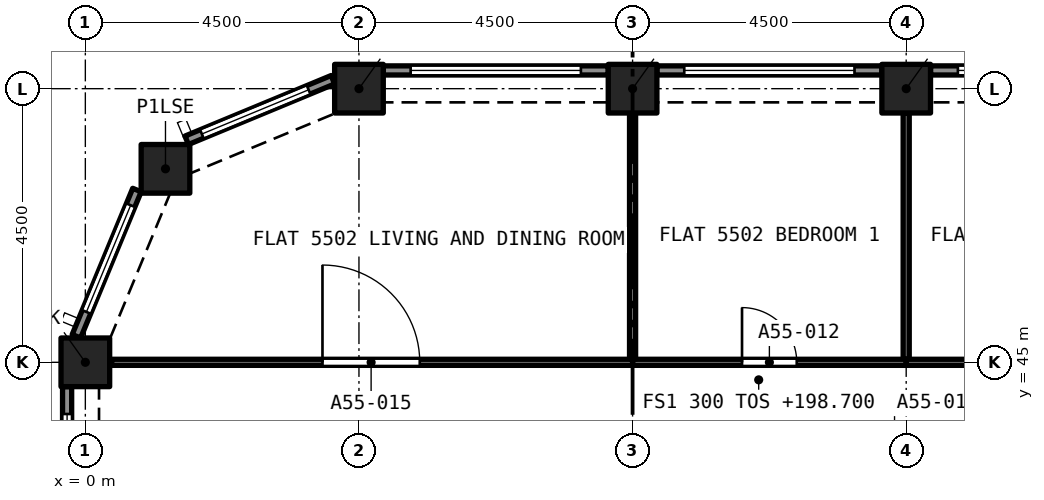
"""IFC4 building model, lengths in metres.
Left out: names, types, materials, properties, quantities, classifications, styles, units other than length and angle.
Written with IfcOpenShell. Run it as: python <this file> out.ifc"""

import sys

from ifc_helpers import new_model, si_unit, direction, frame, frame_2d, origin, origin_2d, place, context, subcontext, project, spatial, rectangle, extrude, element, fill, save


model = new_model("IFC4")
c1 = context("Model", 3, precision=1e-05, world=origin(), true_north=direction((0.0, 1.0)))
c2 = subcontext(c1, "Body", "Model", "MODEL_VIEW")
j1 = project(units=[si_unit("LENGTHUNIT", "METRE"), si_unit("PLANEANGLEUNIT", "RADIAN")], contexts=[c1])
p1 = place(None, origin())
s1 = spatial("IfcSite", under=j1, at=p1, CompositionType="ELEMENT")
p2 = place(p1, origin())
s2 = spatial("IfcBuilding", under=s1, at=p2, CompositionType="ELEMENT")
p3 = place(p2, frame((0.0, 0.0, 198.7)))
s3 = spatial("IfcBuildingStorey", under=s2, at=p3, CompositionType="ELEMENT", Elevation=198.7)
for number, where, z_axis, x_axis in (
    (1, (0.0, 45.0, 0.0), (0.0, 0.0, 1.0), (1.0, 0.0, 0.0)),
    (2, (1.318, 48.182, 0.0), (0.0, 0.0, 1.0), (1.0, 0.0, 0.0)),
    (3, (4.5, 49.5, 0.0), (0.0, 0.0, 1.0), (1.0, 0.0, 0.0)),
    (4, (9.0, 49.5, 0.0), (0.0, 0.0, 1.0), (1.0, 0.0, 0.0)),
    (5, (13.5, 49.5, 0.0), (0.0, 0.0, 1.0), (1.0, 0.0, 0.0)),
):
    element("IfcColumn", number, at=place(p3, frame(where, z_axis=z_axis, x_axis=x_axis)), inside=s3, PredefinedType="COLUMN", context=c2, shape_type="SweptSolid", body=[
        extrude(rectangle(XDim=0.8, YDim=0.8, at=origin_2d()), origin(), (0.0, 0.0, 1.0), 3.2),
    ])
p4 = place(p3, frame((13.9, 49.8, 0.0), z_axis=(0.0, 0.0, 1.0), x_axis=(1.0, 0.0, 0.0)))
e6 = element("IfcWall", 6, at=p4, inside=s3, PredefinedType="SOLIDWALL", context=c2, shape_type="SweptSolid", body=[
    extrude(rectangle(XDim=3.7, YDim=0.15, at=frame_2d((1.85, 0.0))), origin(), (0.0, 0.0, 1.0), 3.2),
])
p5 = place(p4, frame((0.45, 0.0, 0.45)))
e7 = element("IfcOpeningElement", 7, at=p5, cuts=e6, PredefinedType="OPENING", context=c2, shape_type="SweptSolid", body=[
    extrude(rectangle(XDim=2.8, YDim=1.95, at=frame_2d((1.4, 0.975))), frame((0.0, 0.085, 0.0), z_axis=(0.0, -1.0, 0.0), x_axis=(1.0, 0.0, 0.0)), (0.0, 0.0, 1.0), 0.17),
])
p6 = place(p3, frame((9.4, 49.8, 0.0), z_axis=(0.0, 0.0, 1.0), x_axis=(1.0, 0.0, 0.0)))
e8 = element("IfcWall", 8, at=p6, inside=s3, PredefinedType="SOLIDWALL", context=c2, shape_type="SweptSolid", body=[
    extrude(rectangle(XDim=3.7, YDim=0.15, at=frame_2d((1.85, 0.0))), origin(), (0.0, 0.0, 1.0), 3.2),
])
p7 = place(p6, frame((0.45, 0.0, 0.45)))
e9 = element("IfcOpeningElement", 9, at=p7, cuts=e8, PredefinedType="OPENING", context=c2, shape_type="SweptSolid", body=[
    extrude(rectangle(XDim=2.8, YDim=1.95, at=frame_2d((1.4, 0.975))), frame((0.0, 0.085, 0.0), z_axis=(0.0, -1.0, 0.0), x_axis=(1.0, 0.0, 0.0)), (0.0, 0.0, 1.0), 0.17),
])
p8 = place(p3, frame((4.9, 49.8, 0.0), z_axis=(0.0, 0.0, 1.0), x_axis=(1.0, 0.0, 0.0)))
e10 = element("IfcWall", 10, at=p8, inside=s3, PredefinedType="SOLIDWALL", context=c2, shape_type="SweptSolid", body=[
    extrude(rectangle(XDim=3.7, YDim=0.15, at=frame_2d((1.85, 0.0))), origin(), (0.0, 0.0, 1.0), 3.2),
])
p9 = place(p8, frame((0.45, 0.0, 0.45)))
e11 = element("IfcOpeningElement", 11, at=p9, cuts=e10, PredefinedType="OPENING", context=c2, shape_type="SweptSolid", body=[
    extrude(rectangle(XDim=2.8, YDim=1.95, at=frame_2d((1.4, 0.975))), frame((0.0, 0.085, 0.0), z_axis=(0.0, -1.0, 0.0), x_axis=(1.0, 0.0, 0.0)), (0.0, 0.0, 1.0), 0.17),
])
p10 = place(p3, frame((1.667, 48.651, 0.0), z_axis=(0.0, 0.0, 1.0), x_axis=(0.923885342263, 0.382669406082, 0.0)))
e12 = element("IfcWall", 12, at=p10, inside=s3, PredefinedType="SOLIDWALL", context=c2, shape_type="SweptSolid", body=[
    extrude(rectangle(XDim=2.602, YDim=0.15, at=frame_2d((1.301, 0.0))), origin(), (0.0, 0.0, 1.0), 3.2),
])
p11 = place(p10, frame((0.27, 0.0, 0.45)))
e13 = element("IfcOpeningElement", 13, at=p11, cuts=e12, PredefinedType="OPENING", context=c2, shape_type="SweptSolid", body=[
    extrude(rectangle(XDim=1.9, YDim=1.95, at=frame_2d((0.95, 0.975))), frame((0.0, 0.085, 0.0), z_axis=(0.0, -1.0, 0.0), x_axis=(1.0, 0.0, 0.0)), (0.0, 0.0, 1.0), 0.17),
])
p12 = place(p3, frame((-0.147, 45.429, 0.0), z_axis=(0.0, 0.0, 1.0), x_axis=(0.382669406082, 0.923885342263, 0.0)))
e14 = element("IfcWall", 14, at=p12, inside=s3, PredefinedType="SOLIDWALL", context=c2, shape_type="SweptSolid", body=[
    extrude(rectangle(XDim=2.602, YDim=0.15, at=frame_2d((1.301, 0.0))), origin(), (0.0, 0.0, 1.0), 3.2),
])
p13 = place(p12, frame((0.432, 0.0, 0.45)))
e15 = element("IfcOpeningElement", 15, at=p13, cuts=e14, PredefinedType="OPENING", context=c2, shape_type="SweptSolid", body=[
    extrude(rectangle(XDim=1.9, YDim=1.95, at=frame_2d((0.95, 0.975))), frame((0.0, 0.085, 0.0), z_axis=(0.0, -1.0, 0.0), x_axis=(1.0, 0.0, 0.0)), (0.0, 0.0, 1.0), 0.17),
])
p14 = place(p3, frame((-0.3, 40.9, 0.0), z_axis=(0.0, 0.0, 1.0), x_axis=(0.0, 1.0, 0.0)))
e16 = element("IfcWall", 16, at=p14, inside=s3, PredefinedType="SOLIDWALL", context=c2, shape_type="SweptSolid", body=[
    extrude(rectangle(XDim=3.7, YDim=0.15, at=frame_2d((1.85, 0.0))), origin(), (0.0, 0.0, 1.0), 3.2),
])
p15 = place(p14, frame((0.45, 0.0, 0.45)))
e17 = element("IfcOpeningElement", 17, at=p15, cuts=e16, PredefinedType="OPENING", context=c2, shape_type="SweptSolid", body=[
    extrude(rectangle(XDim=2.8, YDim=1.95, at=frame_2d((1.4, 0.975))), frame((0.0, 0.085, 0.0), z_axis=(0.0, -1.0, 0.0), x_axis=(1.0, 0.0, 0.0)), (0.0, 0.0, 1.0), 0.17),
])
p16 = place(p3, frame((13.5, 45.05, 0.0), z_axis=(0.0, 0.0, 1.0), x_axis=(0.0, 1.0, 0.0)))
e18 = element("IfcWall", 18, at=p16, inside=s3, PredefinedType="PARTITIONING", context=c2, shape_type="SweptSolid", body=[
    extrude(rectangle(XDim=4.05, YDim=0.1, at=frame_2d((2.025, 0.0))), origin(), (0.0, 0.0, 1.0), 2.7),
])
p17 = place(p3, frame((9.0, 45.0, 0.0), z_axis=(0.0, 0.0, 1.0), x_axis=(1.0, 0.0, 0.0)))
e19 = element("IfcWall", 19, at=p17, inside=s3, PredefinedType="PARTITIONING", context=c2, shape_type="SweptSolid", body=[
    extrude(rectangle(XDim=4.5, YDim=0.1, at=frame_2d((2.25, 0.0))), origin(), (0.0, 0.0, 1.0), 2.7),
])
p18 = place(p17, frame((1.8, 0.0, 0.0)))
e20 = element("IfcOpeningElement", 20, at=p18, cuts=e19, PredefinedType="OPENING", context=c2, shape_type="SweptSolid", body=[
    extrude(rectangle(XDim=0.9, YDim=2.1, at=frame_2d((0.45, 1.05))), frame((0.0, 0.06, 0.0), z_axis=(0.0, -1.0, 0.0), x_axis=(1.0, 0.0, 0.0)), (0.0, 0.0, 1.0), 0.12),
])
p19 = place(p3, frame((9.0, 45.05, 0.0), z_axis=(0.0, 0.0, 1.0), x_axis=(0.0, 1.0, 0.0)))
e21 = element("IfcWall", 21, at=p19, inside=s3, PredefinedType="PARTITIONING", context=c2, shape_type="SweptSolid", body=[
    extrude(rectangle(XDim=4.05, YDim=0.1, at=frame_2d((2.025, 0.0))), origin(), (0.0, 0.0, 1.0), 2.7),
])
p20 = place(p3, frame((13.5, 45.0, 0.0), z_axis=(0.0, 0.0, 1.0), x_axis=(1.0, 0.0, 0.0)))
e22 = element("IfcWall", 22, at=p20, inside=s3, PredefinedType="PARTITIONING", context=c2, shape_type="SweptSolid", body=[
    extrude(rectangle(XDim=4.1, YDim=0.1, at=frame_2d((2.05, 0.0))), origin(), (0.0, 0.0, 1.0), 2.7),
])
p21 = place(p20, frame((1.8, 0.0, 0.0)))
e23 = element("IfcOpeningElement", 23, at=p21, cuts=e22, PredefinedType="OPENING", context=c2, shape_type="SweptSolid", body=[
    extrude(rectangle(XDim=0.9, YDim=2.1, at=frame_2d((0.45, 1.05))), frame((0.0, 0.06, 0.0), z_axis=(0.0, -1.0, 0.0), x_axis=(1.0, 0.0, 0.0)), (0.0, 0.0, 1.0), 0.12),
])
p22 = place(p3, frame((0.433, 45.0, 0.0), z_axis=(0.0, 0.0, 1.0), x_axis=(1.0, 0.0, 0.0)))
e24 = element("IfcWall", 24, at=p22, inside=s3, PredefinedType="PARTITIONING", context=c2, shape_type="SweptSolid", body=[
    extrude(rectangle(XDim=8.567, YDim=0.1, at=frame_2d((4.284, 0.0))), origin(), (0.0, 0.0, 1.0), 2.7),
])
p23 = place(p22, frame((3.467, 0.0, 0.0)))
e25 = element("IfcOpeningElement", 25, at=p23, cuts=e24, PredefinedType="OPENING", context=c2, shape_type="SweptSolid", body=[
    extrude(rectangle(XDim=1.6, YDim=2.1, at=frame_2d((0.8, 1.05))), frame((0.0, 0.06, 0.0), z_axis=(0.0, -1.0, 0.0), x_axis=(1.0, 0.0, 0.0)), (0.0, 0.0, 1.0), 0.12),
])
p24 = place(p5, origin())
e26 = element("IfcWindow", 26, at=p24, inside=s3, PartitioningType="SINGLE_PANEL", PredefinedType="WINDOW", context=c2, shape_type="SweptSolid", body=[
    extrude(rectangle(XDim=2.8, YDim=1.95, at=frame_2d((1.4, 0.975))), frame((0.0, 0.03, 0.0), z_axis=(0.0, -1.0, 0.0), x_axis=(1.0, 0.0, 0.0)), (0.0, 0.0, 1.0), 0.06),
])
fill(e7, e26)
p25 = place(p7, origin())
e27 = element("IfcWindow", 27, at=p25, inside=s3, PartitioningType="SINGLE_PANEL", PredefinedType="WINDOW", context=c2, shape_type="SweptSolid", body=[
    extrude(rectangle(XDim=2.8, YDim=1.95, at=frame_2d((1.4, 0.975))), frame((0.0, 0.03, 0.0), z_axis=(0.0, -1.0, 0.0), x_axis=(1.0, 0.0, 0.0)), (0.0, 0.0, 1.0), 0.06),
])
fill(e9, e27)
p26 = place(p9, origin())
e28 = element("IfcWindow", 28, at=p26, inside=s3, PartitioningType="SINGLE_PANEL", PredefinedType="WINDOW", context=c2, shape_type="SweptSolid", body=[
    extrude(rectangle(XDim=2.8, YDim=1.95, at=frame_2d((1.4, 0.975))), frame((0.0, 0.03, 0.0), z_axis=(0.0, -1.0, 0.0), x_axis=(1.0, 0.0, 0.0)), (0.0, 0.0, 1.0), 0.06),
])
fill(e11, e28)
p27 = place(p11, origin())
e29 = element("IfcWindow", 29, at=p27, inside=s3, PartitioningType="SINGLE_PANEL", PredefinedType="WINDOW", context=c2, shape_type="SweptSolid", body=[
    extrude(rectangle(XDim=1.9, YDim=1.95, at=frame_2d((0.95, 0.975))), frame((0.0, 0.03, 0.0), z_axis=(0.0, -1.0, 0.0), x_axis=(1.0, 0.0, 0.0)), (0.0, 0.0, 1.0), 0.06),
])
fill(e13, e29)
p28 = place(p13, origin())
e30 = element("IfcWindow", 30, at=p28, inside=s3, PartitioningType="SINGLE_PANEL", PredefinedType="WINDOW", context=c2, shape_type="SweptSolid", body=[
    extrude(rectangle(XDim=1.9, YDim=1.95, at=frame_2d((0.95, 0.975))), frame((0.0, 0.03, 0.0), z_axis=(0.0, -1.0, 0.0), x_axis=(1.0, 0.0, 0.0)), (0.0, 0.0, 1.0), 0.06),
])
fill(e15, e30)
p29 = place(p15, origin())
e31 = element("IfcWindow", 31, at=p29, inside=s3, PartitioningType="SINGLE_PANEL", PredefinedType="WINDOW", context=c2, shape_type="SweptSolid", body=[
    extrude(rectangle(XDim=2.8, YDim=1.95, at=frame_2d((1.4, 0.975))), frame((0.0, 0.03, 0.0), z_axis=(0.0, -1.0, 0.0), x_axis=(1.0, 0.0, 0.0)), (0.0, 0.0, 1.0), 0.06),
])
fill(e17, e31)
p30 = place(p18, origin())
e32 = element("IfcDoor", 32, at=p30, inside=s3, OperationType="SINGLE_SWING_LEFT", PredefinedType="DOOR", context=c2, shape_type="SweptSolid", body=[
    extrude(rectangle(XDim=0.9, YDim=2.1, at=frame_2d((0.45, 1.05))), frame((0.0, 0.025, 0.0), z_axis=(0.0, -1.0, 0.0), x_axis=(1.0, 0.0, 0.0)), (0.0, 0.0, 1.0), 0.05),
])
fill(e20, e32)
p31 = place(p23, origin())
e33 = element("IfcDoor", 33, at=p31, inside=s3, OperationType="SINGLE_SWING_LEFT", PredefinedType="DOOR", context=c2, shape_type="SweptSolid", body=[
    extrude(rectangle(XDim=1.6, YDim=2.1, at=frame_2d((0.8, 1.05))), frame((0.0, 0.025, 0.0), z_axis=(0.0, -1.0, 0.0), x_axis=(1.0, 0.0, 0.0)), (0.0, 0.0, 1.0), 0.05),
])
fill(e25, e33)
save(model, sys.argv[1])
